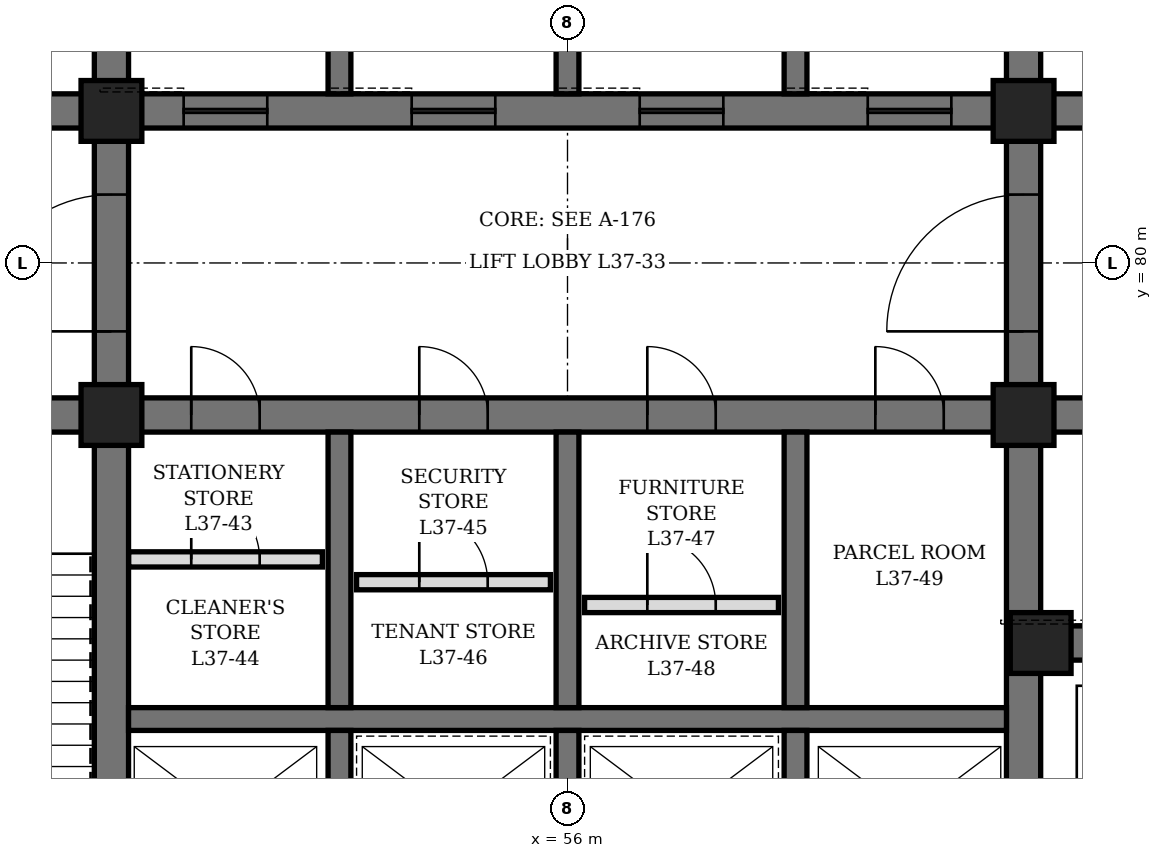
"""IFC4 building model, lengths in metres.
Left out: names, types, materials, properties, quantities, classifications, styles, units other than length and angle.
Written with IfcOpenShell. Run it as: python <this file> out.ifc"""

import sys

from ifc_helpers import new_model, si_unit, direction, frame, frame_2d, origin, origin_2d, place, context, subcontext, project, spatial, rectangle, hollow_rectangle, extrude, element, fill, save


model = new_model("IFC4")
c1 = context("Model", 3, precision=1e-05, world=origin(), true_north=direction((0.0, 1.0)))
c2 = subcontext(c1, "Body", "Model", "MODEL_VIEW")
j1 = project(units=[si_unit("LENGTHUNIT", "METRE"), si_unit("PLANEANGLEUNIT", "RADIAN")], contexts=[c1])
p1 = place(None, origin())
s1 = spatial("IfcSite", under=j1, at=p1, CompositionType="ELEMENT")
p2 = place(p1, origin())
s2 = spatial("IfcBuilding", under=s1, at=p2, CompositionType="ELEMENT")
p3 = place(p2, frame((0.0, 0.0, 166.9)))
s3 = spatial("IfcBuildingStorey", under=s2, at=p3, CompositionType="ELEMENT", Elevation=166.9)
p4 = place(p3, frame((50.0, 71.6, 0.0), z_axis=(0.0, 0.0, 1.0), x_axis=(0.0, 1.0, 0.0)))
e1 = element("IfcWall", 1, at=p4, inside=s3, PredefinedType="SHEAR", context=c2, shape_type="SweptSolid", body=[
    extrude(rectangle(XDim=16.8, YDim=0.45, at=frame_2d((8.4, 0.0))), origin(), (0.0, 0.0, 1.0), 4.2),
])
p5 = place(p4, frame((7.5, 0.0, 0.0)))
e2 = element("IfcOpeningElement", 2, at=p5, cuts=e1, PredefinedType="OPENING", context=c2, shape_type="SweptSolid", body=[
    extrude(rectangle(XDim=1.8, YDim=2.4, at=frame_2d((0.9, 1.2))), frame((0.0, 0.235, 0.0), z_axis=(0.0, -1.0, 0.0), x_axis=(1.0, 0.0, 0.0)), (0.0, 0.0, 1.0), 0.47),
])
p6 = place(p3, frame((62.0, 71.6, 0.0), z_axis=(0.0, 0.0, 1.0), x_axis=(0.0, 1.0, 0.0)))
e3 = element("IfcWall", 3, at=p6, inside=s3, PredefinedType="SHEAR", context=c2, shape_type="SweptSolid", body=[
    extrude(rectangle(XDim=16.8, YDim=0.45, at=frame_2d((8.4, 0.0))), origin(), (0.0, 0.0, 1.0), 4.2),
])
p7 = place(p6, frame((7.5, 0.0, 0.0)))
e4 = element("IfcOpeningElement", 4, at=p7, cuts=e3, PredefinedType="OPENING", context=c2, shape_type="SweptSolid", body=[
    extrude(rectangle(XDim=1.8, YDim=2.4, at=frame_2d((0.9, 1.2))), frame((0.0, 0.235, 0.0), z_axis=(0.0, -1.0, 0.0), x_axis=(1.0, 0.0, 0.0)), (0.0, 0.0, 1.0), 0.47),
])
p8 = place(p3, frame((44.6, 78.0, 0.0), z_axis=(0.0, 0.0, 1.0), x_axis=(1.0, 0.0, 0.0)))
e5 = element("IfcWall", 5, at=p8, inside=s3, PredefinedType="SHEAR", context=c2, shape_type="SweptSolid", body=[
    extrude(rectangle(XDim=5.175, YDim=0.45, at=frame_2d((2.587, 0.0))), origin(), (0.0, 0.0, 1.0), 4.2),
])
p9 = place(p8, frame((1.8, 0.0, 0.0)))
e6 = element("IfcOpeningElement", 6, at=p9, cuts=e5, PredefinedType="OPENING", context=c2, shape_type="SweptSolid", body=[
    extrude(rectangle(XDim=1.2, YDim=2.1, at=frame_2d((0.6, 1.05))), frame((0.0, 0.235, 0.0), z_axis=(0.0, -1.0, 0.0), x_axis=(1.0, 0.0, 0.0)), (0.0, 0.0, 1.0), 0.47),
])
p10 = place(p3, frame((44.6, 82.0, 0.0), z_axis=(0.0, 0.0, 1.0), x_axis=(1.0, 0.0, 0.0)))
e7 = element("IfcWall", 7, at=p10, inside=s3, PredefinedType="SHEAR", context=c2, shape_type="SweptSolid", body=[
    extrude(rectangle(XDim=5.175, YDim=0.45, at=frame_2d((2.587, 0.0))), origin(), (0.0, 0.0, 1.0), 4.2),
])
p11 = place(p10, frame((0.7, 0.0, 0.0)))
e8 = element("IfcOpeningElement", 8, at=p11, cuts=e7, PredefinedType="OPENING", context=c2, shape_type="SweptSolid", body=[
    extrude(rectangle(XDim=0.9, YDim=2.1, at=frame_2d((0.45, 1.05))), frame((0.0, 0.235, 0.0), z_axis=(0.0, -1.0, 0.0), x_axis=(1.0, 0.0, 0.0)), (0.0, 0.0, 1.0), 0.47),
])
p12 = place(p3, frame((62.225, 75.0, 0.0), z_axis=(0.0, 0.0, 1.0), x_axis=(1.0, 0.0, 0.0)))
e9 = element("IfcWall", 9, at=p12, inside=s3, PredefinedType="SHEAR", context=c2, shape_type="SweptSolid", body=[
    extrude(rectangle(XDim=5.175, YDim=0.45, at=frame_2d((2.587, 0.0))), origin(), (0.0, 0.0, 1.0), 4.2),
])
p13 = place(p12, frame((0.675, 0.0, 0.0)))
e10 = element("IfcOpeningElement", 10, at=p13, cuts=e9, PredefinedType="OPENING", context=c2, shape_type="SweptSolid", body=[
    extrude(rectangle(XDim=1.2, YDim=2.2, at=frame_2d((0.6, 1.1))), frame((0.0, 0.235, 0.0), z_axis=(0.0, -1.0, 0.0), x_axis=(1.0, 0.0, 0.0)), (0.0, 0.0, 1.0), 0.47),
])
p14 = place(p12, frame((3.425, 0.0, 0.0)))
e11 = element("IfcOpeningElement", 11, at=p14, cuts=e9, PredefinedType="OPENING", context=c2, shape_type="SweptSolid", body=[
    extrude(rectangle(XDim=1.2, YDim=2.2, at=frame_2d((0.6, 1.1))), frame((0.0, 0.235, 0.0), z_axis=(0.0, -1.0, 0.0), x_axis=(1.0, 0.0, 0.0)), (0.0, 0.0, 1.0), 0.47),
])
p15 = place(p3, frame((62.225, 78.0, 0.0), z_axis=(0.0, 0.0, 1.0), x_axis=(1.0, 0.0, 0.0)))
e12 = element("IfcWall", 12, at=p15, inside=s3, PredefinedType="SHEAR", context=c2, shape_type="SweptSolid", body=[
    extrude(rectangle(XDim=5.175, YDim=0.45, at=frame_2d((2.587, 0.0))), origin(), (0.0, 0.0, 1.0), 4.2),
])
p16 = place(p15, frame((2.175, 0.0, 0.0)))
e13 = element("IfcOpeningElement", 13, at=p16, cuts=e12, PredefinedType="OPENING", context=c2, shape_type="SweptSolid", body=[
    extrude(rectangle(XDim=1.2, YDim=2.1, at=frame_2d((0.6, 1.05))), frame((0.0, 0.235, 0.0), z_axis=(0.0, -1.0, 0.0), x_axis=(1.0, 0.0, 0.0)), (0.0, 0.0, 1.0), 0.47),
])
p17 = place(p3, frame((62.225, 82.0, 0.0), z_axis=(0.0, 0.0, 1.0), x_axis=(1.0, 0.0, 0.0)))
e14 = element("IfcWall", 14, at=p17, inside=s3, PredefinedType="SHEAR", context=c2, shape_type="SweptSolid", body=[
    extrude(rectangle(XDim=5.175, YDim=0.45, at=frame_2d((2.587, 0.0))), origin(), (0.0, 0.0, 1.0), 4.2),
])
p18 = place(p17, frame((2.175, 0.0, 0.0)))
e15 = element("IfcOpeningElement", 15, at=p18, cuts=e14, PredefinedType="OPENING", context=c2, shape_type="SweptSolid", body=[
    extrude(rectangle(XDim=1.2, YDim=2.1, at=frame_2d((0.6, 1.05))), frame((0.0, 0.235, 0.0), z_axis=(0.0, -1.0, 0.0), x_axis=(1.0, 0.0, 0.0)), (0.0, 0.0, 1.0), 0.47),
])
p19 = place(p3, frame((50.225, 78.0, 0.0), z_axis=(0.0, 0.0, 1.0), x_axis=(1.0, 0.0, 0.0)))
e16 = element("IfcWall", 16, at=p19, inside=s3, PredefinedType="SHEAR", context=c2, shape_type="SweptSolid", body=[
    extrude(rectangle(XDim=11.55, YDim=0.45, at=frame_2d((5.775, 0.0))), origin(), (0.0, 0.0, 1.0), 4.2),
])
p20 = place(p19, frame((0.825, 0.0, 0.0)))
e17 = element("IfcOpeningElement", 17, at=p20, cuts=e16, PredefinedType="OPENING", context=c2, shape_type="SweptSolid", body=[
    extrude(rectangle(XDim=0.9, YDim=2.1, at=frame_2d((0.45, 1.05))), frame((0.0, 0.235, 0.0), z_axis=(0.0, -1.0, 0.0), x_axis=(1.0, 0.0, 0.0)), (0.0, 0.0, 1.0), 0.47),
])
p21 = place(p19, frame((3.825, 0.0, 0.0)))
e18 = element("IfcOpeningElement", 18, at=p21, cuts=e16, PredefinedType="OPENING", context=c2, shape_type="SweptSolid", body=[
    extrude(rectangle(XDim=0.9, YDim=2.1, at=frame_2d((0.45, 1.05))), frame((0.0, 0.235, 0.0), z_axis=(0.0, -1.0, 0.0), x_axis=(1.0, 0.0, 0.0)), (0.0, 0.0, 1.0), 0.47),
])
p22 = place(p19, frame((6.825, 0.0, 0.0)))
e19 = element("IfcOpeningElement", 19, at=p22, cuts=e16, PredefinedType="OPENING", context=c2, shape_type="SweptSolid", body=[
    extrude(rectangle(XDim=0.9, YDim=2.1, at=frame_2d((0.45, 1.05))), frame((0.0, 0.235, 0.0), z_axis=(0.0, -1.0, 0.0), x_axis=(1.0, 0.0, 0.0)), (0.0, 0.0, 1.0), 0.47),
])
p23 = place(p19, frame((9.825, 0.0, 0.0)))
e20 = element("IfcOpeningElement", 20, at=p23, cuts=e16, PredefinedType="OPENING", context=c2, shape_type="SweptSolid", body=[
    extrude(rectangle(XDim=0.9, YDim=2.1, at=frame_2d((0.45, 1.05))), frame((0.0, 0.235, 0.0), z_axis=(0.0, -1.0, 0.0), x_axis=(1.0, 0.0, 0.0)), (0.0, 0.0, 1.0), 0.47),
])
p24 = place(p3, frame((50.225, 82.0, 0.0), z_axis=(0.0, 0.0, 1.0), x_axis=(1.0, 0.0, 0.0)))
e21 = element("IfcWall", 21, at=p24, inside=s3, PredefinedType="SHEAR", context=c2, shape_type="SweptSolid", body=[
    extrude(rectangle(XDim=11.55, YDim=0.45, at=frame_2d((5.775, 0.0))), origin(), (0.0, 0.0, 1.0), 4.2),
])
p25 = place(p24, frame((0.725, 0.0, 0.0)))
e22 = element("IfcOpeningElement", 22, at=p25, cuts=e21, PredefinedType="OPENING", context=c2, shape_type="SweptSolid", body=[
    extrude(rectangle(XDim=1.1, YDim=2.2, at=frame_2d((0.55, 1.1))), frame((0.0, 0.235, 0.0), z_axis=(0.0, -1.0, 0.0), x_axis=(1.0, 0.0, 0.0)), (0.0, 0.0, 1.0), 0.47),
])
p26 = place(p24, frame((3.725, 0.0, 0.0)))
e23 = element("IfcOpeningElement", 23, at=p26, cuts=e21, PredefinedType="OPENING", context=c2, shape_type="SweptSolid", body=[
    extrude(rectangle(XDim=1.1, YDim=2.2, at=frame_2d((0.55, 1.1))), frame((0.0, 0.235, 0.0), z_axis=(0.0, -1.0, 0.0), x_axis=(1.0, 0.0, 0.0)), (0.0, 0.0, 1.0), 0.47),
])
p27 = place(p24, frame((6.725, 0.0, 0.0)))
e24 = element("IfcOpeningElement", 24, at=p27, cuts=e21, PredefinedType="OPENING", context=c2, shape_type="SweptSolid", body=[
    extrude(rectangle(XDim=1.1, YDim=2.2, at=frame_2d((0.55, 1.1))), frame((0.0, 0.235, 0.0), z_axis=(0.0, -1.0, 0.0), x_axis=(1.0, 0.0, 0.0)), (0.0, 0.0, 1.0), 0.47),
])
p28 = place(p24, frame((9.725, 0.0, 0.0)))
e25 = element("IfcOpeningElement", 25, at=p28, cuts=e21, PredefinedType="OPENING", context=c2, shape_type="SweptSolid", body=[
    extrude(rectangle(XDim=1.1, YDim=2.2, at=frame_2d((0.55, 1.1))), frame((0.0, 0.235, 0.0), z_axis=(0.0, -1.0, 0.0), x_axis=(1.0, 0.0, 0.0)), (0.0, 0.0, 1.0), 0.47),
])
p29 = place(p3, frame((50.225, 74.0, 0.0), z_axis=(0.0, 0.0, 1.0), x_axis=(1.0, 0.0, 0.0)))
e26 = element("IfcWall", 26, at=p29, inside=s3, PredefinedType="SHEAR", context=c2, shape_type="SweptSolid", body=[
    extrude(rectangle(XDim=11.55, YDim=0.3, at=frame_2d((5.775, 0.0))), origin(), (0.0, 0.0, 1.0), 4.2),
])
p30 = place(p3, frame((53.0, 71.6, 0.0), z_axis=(0.0, 0.0, 1.0), x_axis=(0.0, 1.0, 0.0)))
e27 = element("IfcWall", 27, at=p30, inside=s3, PredefinedType="SHEAR", context=c2, shape_type="SweptSolid", body=[
    extrude(rectangle(XDim=2.25, YDim=0.3, at=frame_2d((1.125, 0.0))), origin(), (0.0, 0.0, 1.0), 4.2),
])
p31 = place(p3, frame((53.0, 74.15, 0.0), z_axis=(0.0, 0.0, 1.0), x_axis=(0.0, 1.0, 0.0)))
e28 = element("IfcWall", 28, at=p31, inside=s3, PredefinedType="SHEAR", context=c2, shape_type="SweptSolid", body=[
    extrude(rectangle(XDim=3.625, YDim=0.3, at=frame_2d((1.812, 0.0))), origin(), (0.0, 0.0, 1.0), 4.2),
])
p32 = place(p3, frame((53.0, 82.225, 0.0), z_axis=(0.0, 0.0, 1.0), x_axis=(0.0, 1.0, 0.0)))
e29 = element("IfcWall", 29, at=p32, inside=s3, PredefinedType="SHEAR", context=c2, shape_type="SweptSolid", body=[
    extrude(rectangle(XDim=3.55, YDim=0.3, at=frame_2d((1.775, 0.0))), origin(), (0.0, 0.0, 1.0), 4.2),
])
p33 = place(p3, frame((56.0, 71.6, 0.0), z_axis=(0.0, 0.0, 1.0), x_axis=(0.0, 1.0, 0.0)))
e30 = element("IfcWall", 30, at=p33, inside=s3, PredefinedType="SHEAR", context=c2, shape_type="SweptSolid", body=[
    extrude(rectangle(XDim=2.25, YDim=0.3, at=frame_2d((1.125, 0.0))), origin(), (0.0, 0.0, 1.0), 4.2),
])
p34 = place(p3, frame((56.0, 74.15, 0.0), z_axis=(0.0, 0.0, 1.0), x_axis=(0.0, 1.0, 0.0)))
e31 = element("IfcWall", 31, at=p34, inside=s3, PredefinedType="SHEAR", context=c2, shape_type="SweptSolid", body=[
    extrude(rectangle(XDim=3.625, YDim=0.3, at=frame_2d((1.812, 0.0))), origin(), (0.0, 0.0, 1.0), 4.2),
])
p35 = place(p3, frame((56.0, 82.225, 0.0), z_axis=(0.0, 0.0, 1.0), x_axis=(0.0, 1.0, 0.0)))
e32 = element("IfcWall", 32, at=p35, inside=s3, PredefinedType="SHEAR", context=c2, shape_type="SweptSolid", body=[
    extrude(rectangle(XDim=3.55, YDim=0.3, at=frame_2d((1.775, 0.0))), origin(), (0.0, 0.0, 1.0), 4.2),
])
p36 = place(p3, frame((59.0, 71.6, 0.0), z_axis=(0.0, 0.0, 1.0), x_axis=(0.0, 1.0, 0.0)))
e33 = element("IfcWall", 33, at=p36, inside=s3, PredefinedType="SHEAR", context=c2, shape_type="SweptSolid", body=[
    extrude(rectangle(XDim=2.25, YDim=0.3, at=frame_2d((1.125, 0.0))), origin(), (0.0, 0.0, 1.0), 4.2),
])
p37 = place(p3, frame((59.0, 74.15, 0.0), z_axis=(0.0, 0.0, 1.0), x_axis=(0.0, 1.0, 0.0)))
e34 = element("IfcWall", 34, at=p37, inside=s3, PredefinedType="SHEAR", context=c2, shape_type="SweptSolid", body=[
    extrude(rectangle(XDim=3.625, YDim=0.3, at=frame_2d((1.812, 0.0))), origin(), (0.0, 0.0, 1.0), 4.2),
])
p38 = place(p3, frame((59.0, 82.225, 0.0), z_axis=(0.0, 0.0, 1.0), x_axis=(0.0, 1.0, 0.0)))
e35 = element("IfcWall", 35, at=p38, inside=s3, PredefinedType="SHEAR", context=c2, shape_type="SweptSolid", body=[
    extrude(rectangle(XDim=3.55, YDim=0.3, at=frame_2d((1.775, 0.0))), origin(), (0.0, 0.0, 1.0), 4.2),
])
for number, where, z_axis, x_axis in (
    (36, (50.0, 78.0, 0.0), (0.0, 0.0, 1.0), (1.0, 0.0, 0.0)),
    (37, (50.0, 82.0, 0.0), (0.0, 0.0, 1.0), (1.0, 0.0, 0.0)),
    (38, (62.0, 78.0, 0.0), (0.0, 0.0, 1.0), (1.0, 0.0, 0.0)),
    (39, (62.0, 82.0, 0.0), (0.0, 0.0, 1.0), (1.0, 0.0, 0.0)),
    (40, (62.225, 75.0, 0.0), (0.0, 0.0, 1.0), (1.0, 0.0, 0.0)),
):
    element("IfcColumn", number, at=place(p3, frame(where, z_axis=z_axis, x_axis=x_axis)), inside=s3, PredefinedType="COLUMN", context=c2, shape_type="SweptSolid", body=[
        extrude(hollow_rectangle(XDim=0.8, YDim=0.8, WallThickness=0.1, at=origin_2d()), origin(), (0.0, 0.0, 1.0), 4.2),
    ])
p39 = place(p3, frame((50.225, 76.1, 0.0), z_axis=(0.0, 0.0, 1.0), x_axis=(1.0, 0.0, 0.0)))
e41 = element("IfcWall", 41, at=p39, inside=s3, PredefinedType="PARTITIONING", context=c2, shape_type="SweptSolid", body=[
    extrude(rectangle(XDim=2.55, YDim=0.2, at=frame_2d((1.275, 0.0))), origin(), (0.0, 0.0, 1.0), 4.04),
])
p40 = place(p39, frame((0.825, 0.0, 0.0)))
e42 = element("IfcOpeningElement", 42, at=p40, cuts=e41, PredefinedType="OPENING", context=c2, shape_type="SweptSolid", body=[
    extrude(rectangle(XDim=0.9, YDim=2.1, at=frame_2d((0.45, 1.05))), frame((0.0, 0.11, 0.0), z_axis=(0.0, -1.0, 0.0), x_axis=(1.0, 0.0, 0.0)), (0.0, 0.0, 1.0), 0.22),
])
p41 = place(p3, frame((53.225, 75.8, 0.0), z_axis=(0.0, 0.0, 1.0), x_axis=(1.0, 0.0, 0.0)))
e43 = element("IfcWall", 43, at=p41, inside=s3, PredefinedType="PARTITIONING", context=c2, shape_type="SweptSolid", body=[
    extrude(rectangle(XDim=2.55, YDim=0.2, at=frame_2d((1.275, 0.0))), origin(), (0.0, 0.0, 1.0), 4.04),
])
p42 = place(p41, frame((0.825, 0.0, 0.0)))
e44 = element("IfcOpeningElement", 44, at=p42, cuts=e43, PredefinedType="OPENING", context=c2, shape_type="SweptSolid", body=[
    extrude(rectangle(XDim=0.9, YDim=2.1, at=frame_2d((0.45, 1.05))), frame((0.0, 0.11, 0.0), z_axis=(0.0, -1.0, 0.0), x_axis=(1.0, 0.0, 0.0)), (0.0, 0.0, 1.0), 0.22),
])
p43 = place(p3, frame((56.225, 75.5, 0.0), z_axis=(0.0, 0.0, 1.0), x_axis=(1.0, 0.0, 0.0)))
e45 = element("IfcWall", 45, at=p43, inside=s3, PredefinedType="PARTITIONING", context=c2, shape_type="SweptSolid", body=[
    extrude(rectangle(XDim=2.55, YDim=0.2, at=frame_2d((1.275, 0.0))), origin(), (0.0, 0.0, 1.0), 4.04),
])
p44 = place(p43, frame((0.825, 0.0, 0.0)))
e46 = element("IfcOpeningElement", 46, at=p44, cuts=e45, PredefinedType="OPENING", context=c2, shape_type="SweptSolid", body=[
    extrude(rectangle(XDim=0.9, YDim=2.1, at=frame_2d((0.45, 1.05))), frame((0.0, 0.11, 0.0), z_axis=(0.0, -1.0, 0.0), x_axis=(1.0, 0.0, 0.0)), (0.0, 0.0, 1.0), 0.22),
])
p45 = place(p20, origin())
e47 = element("IfcDoor", 47, at=p45, inside=s3, OperationType="SINGLE_SWING_LEFT", PredefinedType="DOOR", context=c2, shape_type="SweptSolid", body=[
    extrude(rectangle(XDim=0.9, YDim=2.1, at=frame_2d((0.45, 1.05))), frame((0.0, 0.225, 0.0), z_axis=(0.0, -1.0, 0.0), x_axis=(1.0, 0.0, 0.0)), (0.0, 0.0, 1.0), 0.449),
])
fill(e17, e47)
p46 = place(p40, origin())
e48 = element("IfcDoor", 48, at=p46, inside=s3, OperationType="SINGLE_SWING_LEFT", PredefinedType="DOOR", context=c2, shape_type="SweptSolid", body=[
    extrude(rectangle(XDim=0.9, YDim=2.1, at=frame_2d((0.45, 1.05))), frame((0.0, 0.1, 0.0), z_axis=(0.0, -1.0, 0.0), x_axis=(1.0, 0.0, 0.0)), (0.0, 0.0, 1.0), 0.199),
])
fill(e42, e48)
p47 = place(p21, origin())
e49 = element("IfcDoor", 49, at=p47, inside=s3, OperationType="SINGLE_SWING_LEFT", PredefinedType="DOOR", context=c2, shape_type="SweptSolid", body=[
    extrude(rectangle(XDim=0.9, YDim=2.1, at=frame_2d((0.45, 1.05))), frame((0.0, 0.225, 0.0), z_axis=(0.0, -1.0, 0.0), x_axis=(1.0, 0.0, 0.0)), (0.0, 0.0, 1.0), 0.449),
])
fill(e18, e49)
p48 = place(p42, origin())
e50 = element("IfcDoor", 50, at=p48, inside=s3, OperationType="SINGLE_SWING_LEFT", PredefinedType="DOOR", context=c2, shape_type="SweptSolid", body=[
    extrude(rectangle(XDim=0.9, YDim=2.1, at=frame_2d((0.45, 1.05))), frame((0.0, 0.1, 0.0), z_axis=(0.0, -1.0, 0.0), x_axis=(1.0, 0.0, 0.0)), (0.0, 0.0, 1.0), 0.199),
])
fill(e44, e50)
p49 = place(p22, origin())
e51 = element("IfcDoor", 51, at=p49, inside=s3, OperationType="SINGLE_SWING_LEFT", PredefinedType="DOOR", context=c2, shape_type="SweptSolid", body=[
    extrude(rectangle(XDim=0.9, YDim=2.1, at=frame_2d((0.45, 1.05))), frame((0.0, 0.225, 0.0), z_axis=(0.0, -1.0, 0.0), x_axis=(1.0, 0.0, 0.0)), (0.0, 0.0, 1.0), 0.449),
])
fill(e19, e51)
p50 = place(p44, origin())
e52 = element("IfcDoor", 52, at=p50, inside=s3, OperationType="SINGLE_SWING_LEFT", PredefinedType="DOOR", context=c2, shape_type="SweptSolid", body=[
    extrude(rectangle(XDim=0.9, YDim=2.1, at=frame_2d((0.45, 1.05))), frame((0.0, 0.1, 0.0), z_axis=(0.0, -1.0, 0.0), x_axis=(1.0, 0.0, 0.0)), (0.0, 0.0, 1.0), 0.199),
])
fill(e46, e52)
p51 = place(p23, origin())
e53 = element("IfcDoor", 53, at=p51, inside=s3, OperationType="SINGLE_SWING_LEFT", PredefinedType="DOOR", context=c2, shape_type="SweptSolid", body=[
    extrude(rectangle(XDim=0.9, YDim=2.1, at=frame_2d((0.45, 1.05))), frame((0.0, 0.225, 0.0), z_axis=(0.0, -1.0, 0.0), x_axis=(1.0, 0.0, 0.0)), (0.0, 0.0, 1.0), 0.449),
])
fill(e20, e53)
p52 = place(p5, origin())
e54 = element("IfcDoor", 54, at=p52, inside=s3, OperationType="DOUBLE_DOOR_SINGLE_SWING", PredefinedType="DOOR", context=c2, shape_type="SweptSolid", body=[
    extrude(rectangle(XDim=1.8, YDim=2.4, at=frame_2d((0.9, 1.2))), frame((0.0, 0.225, 0.0), z_axis=(0.0, -1.0, 0.0), x_axis=(1.0, 0.0, 0.0)), (0.0, 0.0, 1.0), 0.449),
])
fill(e2, e54)
p53 = place(p7, origin())
e55 = element("IfcDoor", 55, at=p53, inside=s3, OperationType="DOUBLE_DOOR_SINGLE_SWING", PredefinedType="DOOR", context=c2, shape_type="SweptSolid", body=[
    extrude(rectangle(XDim=1.8, YDim=2.4, at=frame_2d((0.9, 1.2))), frame((0.0, 0.225, 0.0), z_axis=(0.0, -1.0, 0.0), x_axis=(1.0, 0.0, 0.0)), (0.0, 0.0, 1.0), 0.449),
])
fill(e4, e55)
p54 = place(p25, origin())
e56 = element("IfcDoor", 56, at=p54, inside=s3, OperationType="SLIDING_TO_LEFT", PredefinedType="DOOR", context=c2, shape_type="SweptSolid", body=[
    extrude(rectangle(XDim=1.1, YDim=2.2, at=frame_2d((0.55, 1.1))), frame((0.0, 0.225, 0.0), z_axis=(0.0, -1.0, 0.0), x_axis=(1.0, 0.0, 0.0)), (0.0, 0.0, 1.0), 0.449),
])
fill(e22, e56)
p55 = place(p26, origin())
e57 = element("IfcDoor", 57, at=p55, inside=s3, OperationType="SLIDING_TO_LEFT", PredefinedType="DOOR", context=c2, shape_type="SweptSolid", body=[
    extrude(rectangle(XDim=1.1, YDim=2.2, at=frame_2d((0.55, 1.1))), frame((0.0, 0.225, 0.0), z_axis=(0.0, -1.0, 0.0), x_axis=(1.0, 0.0, 0.0)), (0.0, 0.0, 1.0), 0.449),
])
fill(e23, e57)
p56 = place(p27, origin())
e58 = element("IfcDoor", 58, at=p56, inside=s3, OperationType="SLIDING_TO_LEFT", PredefinedType="DOOR", context=c2, shape_type="SweptSolid", body=[
    extrude(rectangle(XDim=1.1, YDim=2.2, at=frame_2d((0.55, 1.1))), frame((0.0, 0.225, 0.0), z_axis=(0.0, -1.0, 0.0), x_axis=(1.0, 0.0, 0.0)), (0.0, 0.0, 1.0), 0.449),
])
fill(e24, e58)
p57 = place(p28, origin())
e59 = element("IfcDoor", 59, at=p57, inside=s3, OperationType="SLIDING_TO_LEFT", PredefinedType="DOOR", context=c2, shape_type="SweptSolid", body=[
    extrude(rectangle(XDim=1.1, YDim=2.2, at=frame_2d((0.55, 1.1))), frame((0.0, 0.225, 0.0), z_axis=(0.0, -1.0, 0.0), x_axis=(1.0, 0.0, 0.0)), (0.0, 0.0, 1.0), 0.449),
])
fill(e25, e59)
save(model, sys.argv[1])
